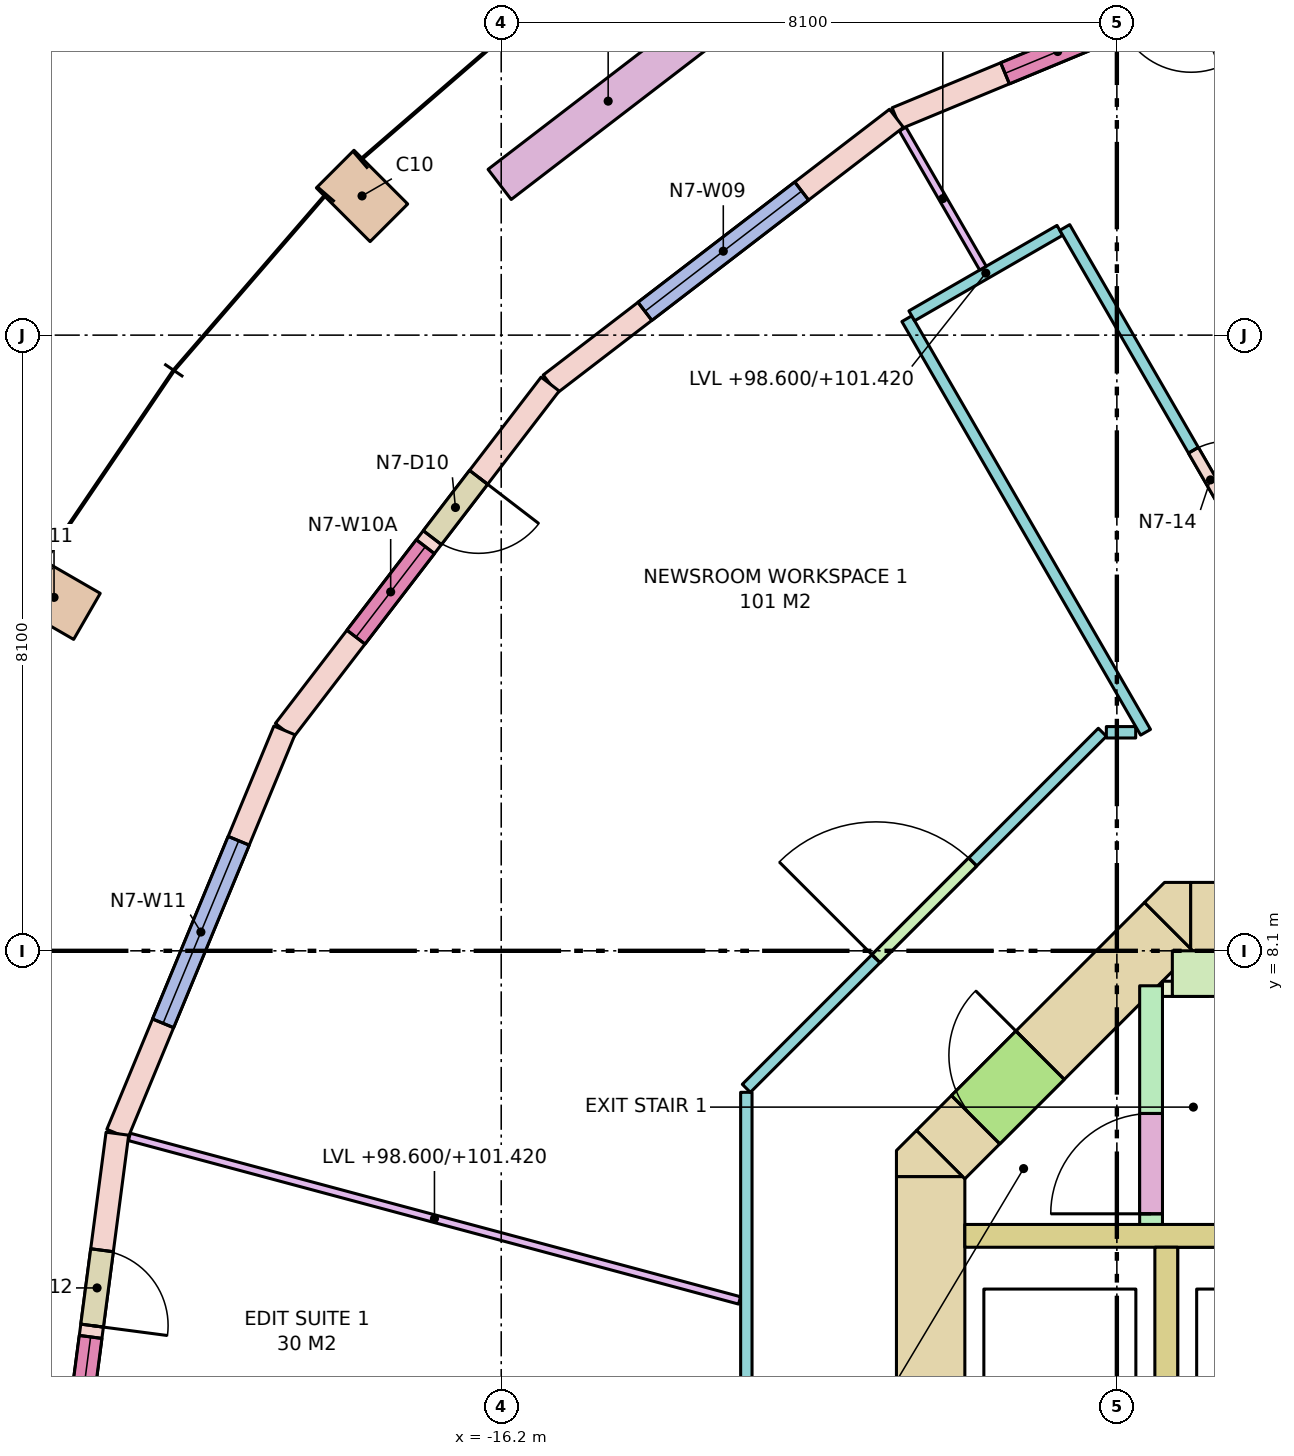
"""IFC4 building model, lengths in metres.
Left out: names, types, materials, properties, quantities, classifications, styles, units other than length and angle.
Written with IfcOpenShell. Run it as: python <this file> out.ifc"""

import sys

from ifc_helpers import new_model, si_unit, direction, frame, frame_2d, origin, origin_2d, place, context, subcontext, project, spatial, polyline, rectangle, outline, extrude, element, fill, save


model = new_model("IFC4")
c1 = context("Model", 3, precision=1e-05, world=origin(), true_north=direction((0.0, 1.0)))
c2 = subcontext(c1, "Body", "Model", "MODEL_VIEW")
j1 = project(units=[si_unit("LENGTHUNIT", "METRE"), si_unit("PLANEANGLEUNIT", "RADIAN")], contexts=[c1])
p1 = place(None, origin())
s1 = spatial("IfcSite", under=j1, at=p1, CompositionType="ELEMENT")
p2 = place(p1, origin())
s2 = spatial("IfcBuilding", under=s1, at=p2, CompositionType="ELEMENT")
p3 = place(p2, frame((0.0, 0.0, 98.6)))
s3 = spatial("IfcBuildingStorey", under=s2, at=p3, CompositionType="ELEMENT", Elevation=98.6)
for number, where, z_axis, x_axis in (
    (1, (-18.031, 18.031, 0.0), (0.0, 0.0, 1.0), (-0.707, -0.707, 0.0)),
    (2, (-22.084, 12.75, 0.0), (0.0, 0.0, 1.0), (-0.5, -0.866, 0.0)),
):
    element("IfcColumn", number, at=place(p3, frame(where, z_axis=z_axis, x_axis=x_axis)), inside=s3, PredefinedType="COLUMN", context=c2, shape_type="SweptSolid", body=[
        extrude(rectangle(XDim=0.7, YDim=1.0, at=origin_2d()), origin(), (0.0, 0.0, 1.0), 4.0),
    ])
p4 = place(p3, frame((-7.13, 8.55, -0.28), z_axis=(0.0, 0.0, 1.0), x_axis=(1.0, 0.0, 0.0)))
e3 = element("IfcWall", 3, at=p4, inside=s3, PredefinedType="SHEAR", context=c2, shape_type="SweptSolid", body=[
    extrude(rectangle(XDim=14.26, YDim=0.9, at=frame_2d((7.13, 0.0))), origin(), (0.0, 0.0, 1.0), 4.0),
])
p5 = place(p4, frame((5.48, 0.0, 0.28)))
e4 = element("IfcOpeningElement", 4, at=p5, cuts=e3, PredefinedType="OPENING", context=c2, shape_type="SweptSolid", body=[
    extrude(rectangle(XDim=0.7, YDim=2.1, at=frame_2d((0.35, 1.05))), frame((0.0, 0.46, 0.0), z_axis=(0.0, -1.0, 0.0), x_axis=(1.0, 0.0, 0.0)), (0.0, 0.0, 1.0), 0.92),
])
p6 = place(p4, frame((7.155, 0.0, 0.28)))
e5 = element("IfcOpeningElement", 5, at=p6, cuts=e3, PredefinedType="OPENING", context=c2, shape_type="SweptSolid", body=[
    extrude(rectangle(XDim=0.9, YDim=2.1, at=frame_2d((0.45, 1.05))), frame((0.0, 0.46, 0.0), z_axis=(0.0, -1.0, 0.0), x_axis=(1.0, 0.0, 0.0)), (0.0, 0.0, 1.0), 0.92),
])
p7 = place(p3, frame((-10.55, -5.13, -0.28), z_axis=(0.0, 0.0, 1.0), x_axis=(0.0, 1.0, 0.0)))
e6 = element("IfcWall", 6, at=p7, inside=s3, PredefinedType="SHEAR", context=c2, shape_type="SweptSolid", body=[
    extrude(rectangle(XDim=10.26, YDim=0.9, at=frame_2d((5.13, 0.0))), origin(), (0.0, 0.0, 1.0), 4.0),
])
p8 = place(p7, frame((4.13, 0.0, 0.28)))
e7 = element("IfcOpeningElement", 7, at=p8, cuts=e6, PredefinedType="OPENING", context=c2, shape_type="SweptSolid", body=[
    extrude(rectangle(XDim=2.0, YDim=2.1, at=frame_2d((1.0, 1.05))), frame((0.0, 0.46, 0.0), z_axis=(0.0, -1.0, 0.0), x_axis=(1.0, 0.0, 0.0)), (0.0, 0.0, 1.0), 0.92),
])
p9 = place(p3, frame((-10.418, 5.418, -0.28), z_axis=(0.0, 0.0, 1.0), x_axis=(0.707106781187, 0.707106781187, 0.0)))
e8 = element("IfcWall", 8, at=p9, inside=s3, PredefinedType="SHEAR", context=c2, shape_type="SweptSolid", body=[
    extrude(rectangle(XDim=4.243, YDim=0.9, at=frame_2d((2.121, 0.0))), origin(), (0.0, 0.0, 1.0), 4.0),
])
p10 = place(p9, frame((0.65, 0.0, 0.28)))
e9 = element("IfcOpeningElement", 9, at=p10, cuts=e8, PredefinedType="OPENING", context=c2, shape_type="SweptSolid", body=[
    extrude(rectangle(XDim=1.2, YDim=2.1, at=frame_2d((0.6, 1.05))), frame((0.0, 0.46, 0.0), z_axis=(0.0, -1.0, 0.0), x_axis=(1.0, 0.0, 0.0)), (0.0, 0.0, 1.0), 0.92),
])
p11 = place(p3, frame((0.0, 0.0, -0.28)))
e10 = element("IfcWall", 10, at=p11, inside=s3, PredefinedType="SHEAR", context=c2, shape_type="SweptSolid", body=[
    extrude(outline(polyline([(-10.736, 5.736), (-10.13, 5.13), (-11.0, 5.13), (-11.0, 5.473), (-10.736, 5.736)])), origin(), (0.0, 0.0, 1.0), 4.0),
])
p12 = place(p3, frame((0.0, 0.0, -0.28)))
e11 = element("IfcWall", 11, at=p12, inside=s3, PredefinedType="SHEAR", context=c2, shape_type="SweptSolid", body=[
    extrude(outline(polyline([(-7.473, 9.0), (-7.13, 9.0), (-7.13, 8.13), (-7.736, 8.736), (-7.473, 9.0)])), origin(), (0.0, 0.0, 1.0), 4.0),
])
p13 = place(p3, frame((-10.1, 4.35, 0.0), z_axis=(0.0, 0.0, 1.0), x_axis=(1.0, 0.0, 0.0)))
e12 = element("IfcWall", 12, at=p13, inside=s3, PredefinedType="SOLIDWALL", context=c2, shape_type="SweptSolid", body=[
    extrude(rectangle(XDim=8.1, YDim=0.3, at=frame_2d((4.05, 0.0))), origin(), (0.0, 0.0, 1.0), 3.72),
])
p14 = place(p3, frame((-7.45, 1.8, 0.0), z_axis=(0.0, 0.0, 1.0), x_axis=(0.0, 1.0, 0.0)))
e13 = element("IfcWall", 13, at=p14, inside=s3, PredefinedType="SOLIDWALL", context=c2, shape_type="SweptSolid", body=[
    extrude(rectangle(XDim=2.4, YDim=0.3, at=frame_2d((1.2, 0.0))), origin(), (0.0, 0.0, 1.0), 3.72),
])
p15 = place(p3, frame((-7.65, 4.5, 0.0), z_axis=(0.0, 0.0, 1.0), x_axis=(0.0, 1.0, 0.0)))
e14 = element("IfcWall", 14, at=p15, inside=s3, PredefinedType="SHEAR", context=c2, shape_type="SweptSolid", body=[
    extrude(rectangle(XDim=3.14, YDim=0.3, at=frame_2d((1.57, 0.0))), origin(), (0.0, 0.0, 1.0), 3.72),
])
p16 = place(p15, frame((0.14, 0.0, 0.0)))
e15 = element("IfcOpeningElement", 15, at=p16, cuts=e14, PredefinedType="OPENING", context=c2, shape_type="SweptSolid", body=[
    extrude(rectangle(XDim=1.32, YDim=2.1, at=frame_2d((0.66, 1.05))), frame((0.0, 0.16, 0.0), z_axis=(0.0, -1.0, 0.0), x_axis=(1.0, 0.0, 0.0)), (0.0, 0.0, 1.0), 0.32),
])
p17 = place(p3, frame((-7.37, 7.8, 0.0), z_axis=(0.0, 0.0, 1.0), x_axis=(1.0, 0.0, 0.0)))
e16 = element("IfcWall", 16, at=p17, inside=s3, PredefinedType="SHEAR", context=c2, shape_type="SweptSolid", body=[
    extrude(rectangle(XDim=5.37, YDim=0.6, at=frame_2d((2.685, 0.0))), origin(), (0.0, 0.0, 1.0), 3.72),
])
p18 = place(p3, frame((-7.5, 7.6, 0.0), z_axis=(0.0, 0.0, 1.0), x_axis=(1.0, 0.0, 0.0)))
e17 = element("IfcWall", 17, at=p18, inside=s3, PredefinedType="SHEAR", context=c2, shape_type="SweptSolid", body=[
    extrude(rectangle(XDim=0.6, YDim=0.2, at=frame_2d((0.3, 0.0))), origin(), (0.0, 0.0, 1.0), 3.72),
])
p19 = place(p3, frame((-5.694, 21.25, 0.0), z_axis=(0.0, 0.0, 1.0), x_axis=(-0.923866055759, -0.382715966503, 0.0)))
e18 = element("IfcWall", 18, at=p19, inside=s3, PredefinedType="STANDARD", context=c2, shape_type="SweptSolid", body=[
    extrude(rectangle(XDim=5.743, YDim=0.3, at=frame_2d((2.872, 0.0))), origin(), (0.0, 0.0, 1.0), 3.72),
])
p20 = place(p19, frame((1.547, 0.0, 0.0)))
e19 = element("IfcOpeningElement", 19, at=p20, cuts=e18, PredefinedType="OPENING", context=c2, shape_type="SweptSolid", body=[
    extrude(rectangle(XDim=1.0, YDim=2.4, at=frame_2d((0.5, 1.2))), frame((0.0, 0.16, 0.0), z_axis=(0.0, -1.0, 0.0), x_axis=(1.0, 0.0, 0.0)), (0.0, 0.0, 1.0), 0.32),
])
p21 = place(p19, frame((2.697, 0.0, 0.8)))
e20 = element("IfcOpeningElement", 20, at=p21, cuts=e18, PredefinedType="OPENING", context=c2, shape_type="SweptSolid", body=[
    extrude(rectangle(XDim=1.5, YDim=2.7, at=frame_2d((0.75, 1.35))), frame((0.0, 0.16, 0.0), z_axis=(0.0, -1.0, 0.0), x_axis=(1.0, 0.0, 0.0)), (0.0, 0.0, 1.0), 0.32),
])
p22 = place(p3, frame((-11.0, 19.052, 0.0), z_axis=(0.0, 0.0, 1.0), x_axis=(-0.793366142647, -0.608744744291, 0.0)))
e21 = element("IfcWall", 21, at=p22, inside=s3, PredefinedType="STANDARD", context=c2, shape_type="SweptSolid", body=[
    extrude(rectangle(XDim=5.743, YDim=0.3, at=frame_2d((2.872, 0.0))), origin(), (0.0, 0.0, 1.0), 3.72),
])
p23 = place(p22, frame((1.572, 0.0, 0.8)))
e22 = element("IfcOpeningElement", 22, at=p23, cuts=e21, PredefinedType="OPENING", context=c2, shape_type="SweptSolid", body=[
    extrude(rectangle(XDim=2.6, YDim=2.7, at=frame_2d((1.3, 1.35))), frame((0.0, 0.16, 0.0), z_axis=(0.0, -1.0, 0.0), x_axis=(1.0, 0.0, 0.0)), (0.0, 0.0, 1.0), 0.32),
])
p24 = place(p3, frame((-15.556, 15.556, 0.0), z_axis=(0.0, 0.0, 1.0), x_axis=(-0.608744744291, -0.793366142647, 0.0)))
e23 = element("IfcWall", 23, at=p24, inside=s3, PredefinedType="STANDARD", context=c2, shape_type="SweptSolid", body=[
    extrude(rectangle(XDim=5.743, YDim=0.3, at=frame_2d((2.872, 0.0))), origin(), (0.0, 0.0, 1.0), 3.72),
])
p25 = place(p24, frame((1.547, 0.0, 0.0)))
e24 = element("IfcOpeningElement", 24, at=p25, cuts=e23, PredefinedType="OPENING", context=c2, shape_type="SweptSolid", body=[
    extrude(rectangle(XDim=1.0, YDim=2.4, at=frame_2d((0.5, 1.2))), frame((0.0, 0.16, 0.0), z_axis=(0.0, -1.0, 0.0), x_axis=(1.0, 0.0, 0.0)), (0.0, 0.0, 1.0), 0.32),
])
p26 = place(p24, frame((2.697, 0.0, 0.8)))
e25 = element("IfcOpeningElement", 25, at=p26, cuts=e23, PredefinedType="OPENING", context=c2, shape_type="SweptSolid", body=[
    extrude(rectangle(XDim=1.5, YDim=2.7, at=frame_2d((0.75, 1.35))), frame((0.0, 0.16, 0.0), z_axis=(0.0, -1.0, 0.0), x_axis=(1.0, 0.0, 0.0)), (0.0, 0.0, 1.0), 0.32),
])
p27 = place(p3, frame((-19.052, 11.0, 0.0), z_axis=(0.0, 0.0, 1.0), x_axis=(-0.382715966503, -0.923866055759, 0.0)))
e26 = element("IfcWall", 26, at=p27, inside=s3, PredefinedType="STANDARD", context=c2, shape_type="SweptSolid", body=[
    extrude(rectangle(XDim=5.743, YDim=0.3, at=frame_2d((2.872, 0.0))), origin(), (0.0, 0.0, 1.0), 3.72),
])
p28 = place(p27, frame((1.572, 0.0, 0.8)))
e27 = element("IfcOpeningElement", 27, at=p28, cuts=e26, PredefinedType="OPENING", context=c2, shape_type="SweptSolid", body=[
    extrude(rectangle(XDim=2.6, YDim=2.7, at=frame_2d((1.3, 1.35))), frame((0.0, 0.16, 0.0), z_axis=(0.0, -1.0, 0.0), x_axis=(1.0, 0.0, 0.0)), (0.0, 0.0, 1.0), 0.32),
])
p29 = place(p3, frame((-21.25, 5.694, 0.0), z_axis=(0.0, 0.0, 1.0), x_axis=(-0.130503995834, -0.991447783331, 0.0)))
e28 = element("IfcWall", 28, at=p29, inside=s3, PredefinedType="STANDARD", context=c2, shape_type="SweptSolid", body=[
    extrude(rectangle(XDim=5.743, YDim=0.3, at=frame_2d((2.872, 0.0))), origin(), (0.0, 0.0, 1.0), 3.72),
])
p30 = place(p29, frame((1.547, 0.0, 0.0)))
e29 = element("IfcOpeningElement", 29, at=p30, cuts=e28, PredefinedType="OPENING", context=c2, shape_type="SweptSolid", body=[
    extrude(rectangle(XDim=1.0, YDim=2.4, at=frame_2d((0.5, 1.2))), frame((0.0, 0.16, 0.0), z_axis=(0.0, -1.0, 0.0), x_axis=(1.0, 0.0, 0.0)), (0.0, 0.0, 1.0), 0.32),
])
p31 = place(p29, frame((2.697, 0.0, 0.8)))
e30 = element("IfcOpeningElement", 30, at=p31, cuts=e28, PredefinedType="OPENING", context=c2, shape_type="SweptSolid", body=[
    extrude(rectangle(XDim=1.5, YDim=2.7, at=frame_2d((0.75, 1.35))), frame((0.0, 0.16, 0.0), z_axis=(0.0, -1.0, 0.0), x_axis=(1.0, 0.0, 0.0)), (0.0, 0.0, 1.0), 0.32),
])
p32 = place(p3, frame((-13.365, 20.374, 0.0), z_axis=(0.0, 0.0, 1.0), x_axis=(-0.793326845617, -0.608795955984, 0.0)))
e31 = element("IfcWall", 31, at=p32, inside=s3, PredefinedType="PARAPET", context=c2, shape_type="SweptSolid", body=[
    extrude(rectangle(XDim=3.6, YDim=0.5, at=frame_2d((1.8, 0.0))), origin(), (0.0, 0.0, 1.0), 0.9),
])
p33 = place(p3, frame((-12.975, 1.275, 0.0), z_axis=(0.0, 0.0, 1.0), x_axis=(0.0, 1.0, 0.0)))
e32 = element("IfcWall", 32, at=p33, inside=s3, PredefinedType="PARTITIONING", context=c2, shape_type="SweptSolid", body=[
    extrude(rectangle(XDim=4.963, YDim=0.15, at=frame_2d((2.482, 0.0))), origin(), (0.0, 0.0, 1.0), 2.82),
])
p34 = place(p3, frame((-12.975, 6.291, 0.0), z_axis=(0.0, 0.0, 1.0), x_axis=(0.707106781187, 0.707106781187, 0.0)))
e33 = element("IfcWall", 33, at=p34, inside=s3, PredefinedType="PARTITIONING", context=c2, shape_type="SweptSolid", body=[
    extrude(rectangle(XDim=6.624, YDim=0.15, at=frame_2d((3.312, 0.0))), origin(), (0.0, 0.0, 1.0), 2.82),
])
p35 = place(p34, frame((2.412, 0.0, 0.0)))
e34 = element("IfcOpeningElement", 34, at=p35, cuts=e33, PredefinedType="OPENING", context=c2, shape_type="SweptSolid", body=[
    extrude(rectangle(XDim=1.8, YDim=2.1, at=frame_2d((0.9, 1.05))), frame((0.0, 0.085, 0.0), z_axis=(0.0, -1.0, 0.0), x_axis=(1.0, 0.0, 0.0)), (0.0, 0.0, 1.0), 0.17),
])
p36 = place(p3, frame((-8.238, 10.975, 0.0), z_axis=(0.0, 0.0, 1.0), x_axis=(1.0, 0.0, 0.0)))
e35 = element("IfcWall", 35, at=p36, inside=s3, PredefinedType="PARTITIONING", context=c2, shape_type="SweptSolid", body=[
    extrude(rectangle(XDim=0.386, YDim=0.15, at=frame_2d((0.193, 0.0))), origin(), (0.0, 0.0, 1.0), 3.72),
])
p37 = place(p3, frame((-7.722, 10.975, 0.0), z_axis=(0.0, 0.0, 1.0), x_axis=(-0.499988183684, 0.86603222583, 0.0)))
e36 = element("IfcWall", 36, at=p37, inside=s3, PredefinedType="PARTITIONING", context=c2, shape_type="SweptSolid", body=[
    extrude(rectangle(XDim=6.283, YDim=0.15, at=frame_2d((3.142, 0.0))), origin(), (0.0, 0.0, 1.0), 3.72),
])
p38 = place(p3, frame((-10.799, 16.454, 0.0), z_axis=(0.0, 0.0, 1.0), x_axis=(0.866017533419, 0.500013631625, 0.0)))
e37 = element("IfcWall", 37, at=p38, inside=s3, PredefinedType="PARTITIONING", context=c2, shape_type="SweptSolid", body=[
    extrude(rectangle(XDim=2.25, YDim=0.15, at=frame_2d((1.125, 0.0))), origin(), (0.0, 0.0, 1.0), 2.82),
])
p39 = place(p3, frame((-8.785, 17.616, 0.0), z_axis=(0.0, 0.0, 1.0), x_axis=(0.500021918639, -0.866012748683, 0.0)))
e38 = element("IfcWall", 38, at=p39, inside=s3, PredefinedType="PARTITIONING", context=c2, shape_type="SweptSolid", body=[
    extrude(rectangle(XDim=7.669, YDim=0.15, at=frame_2d((3.834, 0.0))), origin(), (0.0, 0.0, 1.0), 3.72),
])
p40 = place(p39, frame((3.384, 0.0, 0.0)))
e39 = element("IfcOpeningElement", 39, at=p40, cuts=e38, PredefinedType="OPENING", context=c2, shape_type="SweptSolid", body=[
    extrude(rectangle(XDim=0.9, YDim=2.1, at=frame_2d((0.45, 1.05))), frame((0.0, 0.085, 0.0), z_axis=(0.0, -1.0, 0.0), x_axis=(1.0, 0.0, 0.0)), (0.0, 0.0, 1.0), 0.17),
])
p41 = place(p3, frame((-9.862, 17.081, 0.0), z_axis=(0.0, 0.0, 1.0), x_axis=(-0.500065834316, 0.865987390988, 0.0)))
e40 = element("IfcWall", 40, at=p41, inside=s3, PredefinedType="PARTITIONING", context=c2, shape_type="SweptSolid", body=[
    extrude(rectangle(XDim=2.113, YDim=0.1, at=frame_2d((1.057, 0.0))), origin(), (0.0, 0.0, 1.0), 2.82),
])
p42 = place(p3, frame((-13.064, 3.5, 0.0), z_axis=(0.0, 0.0, 1.0), x_axis=(-0.965920254223, 0.258839839442, 0.0)))
e41 = element("IfcWall", 41, at=p42, inside=s3, PredefinedType="PARTITIONING", context=c2, shape_type="SweptSolid", body=[
    extrude(rectangle(XDim=8.312, YDim=0.1, at=frame_2d((4.156, 0.0))), origin(), (0.0, 0.0, 1.0), 2.82),
])
p43 = place(p21, origin())
e42 = element("IfcWindow", 42, at=p43, inside=s3, PartitioningType="SINGLE_PANEL", PredefinedType="WINDOW", context=c2, shape_type="SweptSolid", body=[
    extrude(rectangle(XDim=1.5, YDim=2.7, at=frame_2d((0.75, 1.35))), frame((0.0, 0.03, 0.0), z_axis=(0.0, -1.0, 0.0), x_axis=(1.0, 0.0, 0.0)), (0.0, 0.0, 1.0), 0.06),
])
fill(e20, e42)
p44 = place(p23, origin())
e43 = element("IfcWindow", 43, at=p44, inside=s3, PartitioningType="SINGLE_PANEL", PredefinedType="WINDOW", context=c2, shape_type="SweptSolid", body=[
    extrude(rectangle(XDim=2.6, YDim=2.7, at=frame_2d((1.3, 1.35))), frame((0.0, 0.03, 0.0), z_axis=(0.0, -1.0, 0.0), x_axis=(1.0, 0.0, 0.0)), (0.0, 0.0, 1.0), 0.06),
])
fill(e22, e43)
p45 = place(p25, origin())
e44 = element("IfcDoor", 44, at=p45, inside=s3, OperationType="SINGLE_SWING_LEFT", PredefinedType="DOOR", context=c2, shape_type="SweptSolid", body=[
    extrude(rectangle(XDim=1.0, YDim=2.4, at=frame_2d((0.5, 1.2))), frame((0.0, 0.025, 0.0), z_axis=(0.0, -1.0, 0.0), x_axis=(1.0, 0.0, 0.0)), (0.0, 0.0, 1.0), 0.05),
])
fill(e24, e44)
p46 = place(p26, origin())
e45 = element("IfcWindow", 45, at=p46, inside=s3, PartitioningType="SINGLE_PANEL", PredefinedType="WINDOW", context=c2, shape_type="SweptSolid", body=[
    extrude(rectangle(XDim=1.5, YDim=2.7, at=frame_2d((0.75, 1.35))), frame((0.0, 0.03, 0.0), z_axis=(0.0, -1.0, 0.0), x_axis=(1.0, 0.0, 0.0)), (0.0, 0.0, 1.0), 0.06),
])
fill(e25, e45)
p47 = place(p28, origin())
e46 = element("IfcWindow", 46, at=p47, inside=s3, PartitioningType="SINGLE_PANEL", PredefinedType="WINDOW", context=c2, shape_type="SweptSolid", body=[
    extrude(rectangle(XDim=2.6, YDim=2.7, at=frame_2d((1.3, 1.35))), frame((0.0, 0.03, 0.0), z_axis=(0.0, -1.0, 0.0), x_axis=(1.0, 0.0, 0.0)), (0.0, 0.0, 1.0), 0.06),
])
fill(e27, e46)
p48 = place(p30, origin())
e47 = element("IfcDoor", 47, at=p48, inside=s3, OperationType="SINGLE_SWING_RIGHT", PredefinedType="DOOR", context=c2, shape_type="SweptSolid", body=[
    extrude(rectangle(XDim=1.0, YDim=2.4, at=frame_2d((0.5, 1.2))), frame((0.0, 0.025, 0.0), z_axis=(0.0, -1.0, 0.0), x_axis=(1.0, 0.0, 0.0)), (0.0, 0.0, 1.0), 0.05),
])
fill(e29, e47)
p49 = place(p31, origin())
e48 = element("IfcWindow", 48, at=p49, inside=s3, PartitioningType="SINGLE_PANEL", PredefinedType="WINDOW", context=c2, shape_type="SweptSolid", body=[
    extrude(rectangle(XDim=1.5, YDim=2.7, at=frame_2d((0.75, 1.35))), frame((0.0, 0.03, 0.0), z_axis=(0.0, -1.0, 0.0), x_axis=(1.0, 0.0, 0.0)), (0.0, 0.0, 1.0), 0.06),
])
fill(e30, e48)
p50 = place(p16, origin())
e49 = element("IfcDoor", 49, at=p50, inside=s3, OperationType="DOUBLE_DOOR_SINGLE_SWING", PredefinedType="DOOR", context=c2, shape_type="SweptSolid", body=[
    extrude(rectangle(XDim=1.32, YDim=2.1, at=frame_2d((0.66, 1.05))), frame((0.0, 0.025, 0.0), z_axis=(0.0, -1.0, 0.0), x_axis=(1.0, 0.0, 0.0)), (0.0, 0.0, 1.0), 0.05),
])
fill(e15, e49)
p51 = place(p10, origin())
e50 = element("IfcDoor", 50, at=p51, inside=s3, OperationType="SINGLE_SWING_RIGHT", PredefinedType="DOOR", context=c2, shape_type="SweptSolid", body=[
    extrude(rectangle(XDim=1.2, YDim=2.1, at=frame_2d((0.6, 1.05))), frame((0.0, 0.025, 0.0), z_axis=(0.0, -1.0, 0.0), x_axis=(1.0, 0.0, 0.0)), (0.0, 0.0, 1.0), 0.05),
])
fill(e9, e50)
p52 = place(p35, origin())
e51 = element("IfcDoor", 51, at=p52, inside=s3, OperationType="DOUBLE_DOOR_SINGLE_SWING", PredefinedType="DOOR", context=c2, shape_type="SweptSolid", body=[
    extrude(rectangle(XDim=1.8, YDim=2.1, at=frame_2d((0.9, 1.05))), frame((0.0, 0.025, 0.0), z_axis=(0.0, -1.0, 0.0), x_axis=(1.0, 0.0, 0.0)), (0.0, 0.0, 1.0), 0.05),
])
fill(e34, e51)
p53 = place(p40, origin())
e52 = element("IfcDoor", 52, at=p53, inside=s3, OperationType="SINGLE_SWING_RIGHT", PredefinedType="DOOR", context=c2, shape_type="SweptSolid", body=[
    extrude(rectangle(XDim=0.9, YDim=2.1, at=frame_2d((0.45, 1.05))), frame((0.0, 0.025, 0.0), z_axis=(0.0, -1.0, 0.0), x_axis=(1.0, 0.0, 0.0)), (0.0, 0.0, 1.0), 0.05),
])
fill(e39, e52)
save(model, sys.argv[1])
